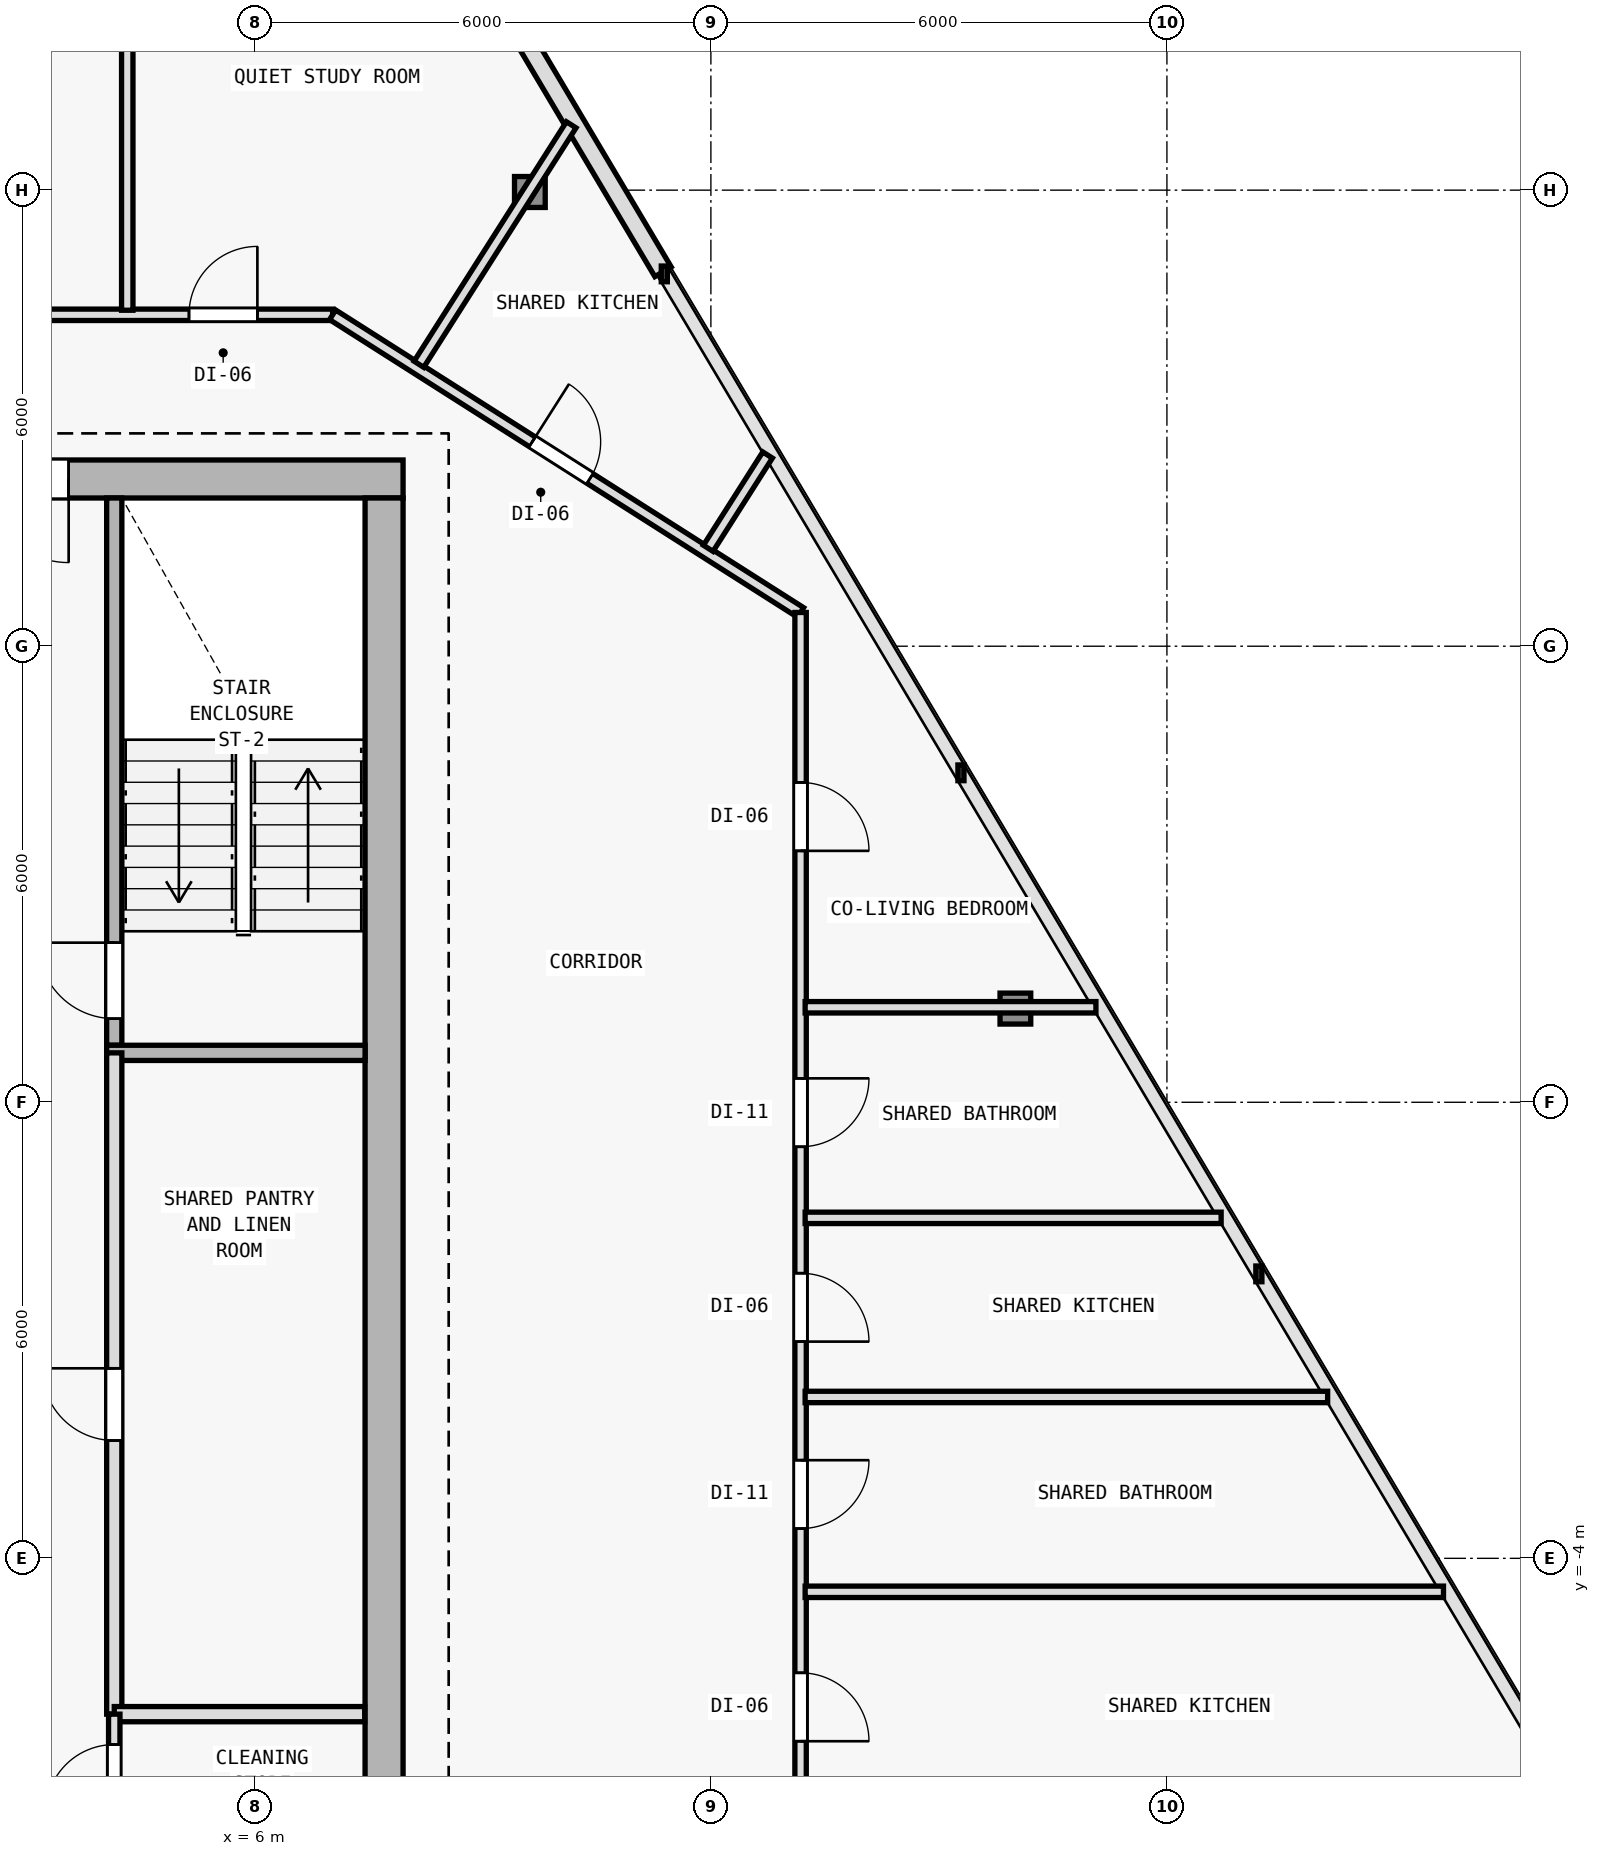
"""IFC4 building model, lengths in metres.
Left out: names, types, materials, properties, quantities, classifications, styles, units other than length and angle.
Written with IfcOpenShell. Run it as: python <this file> out.ifc"""

import sys

from ifc_helpers import new_model, si_unit, direction, frame, frame_2d, origin, origin_2d, place, context, subcontext, project, spatial, rectangle, i_section, extrude, element, fill, save


model = new_model("IFC4")
c1 = context("Model", 3, precision=1e-05, world=origin(), true_north=direction((0.0, 1.0)))
c2 = subcontext(c1, "Body", "Model", "MODEL_VIEW")
j1 = project(units=[si_unit("LENGTHUNIT", "METRE"), si_unit("PLANEANGLEUNIT", "RADIAN")], contexts=[c1])
p1 = place(None, origin())
s1 = spatial("IfcSite", under=j1, at=p1, CompositionType="ELEMENT")
p2 = place(p1, origin())
s2 = spatial("IfcBuilding", under=s1, at=p2, CompositionType="ELEMENT")
p3 = place(p2, frame((0.0, 0.0, 138.6)))
s3 = spatial("IfcBuildingStorey", under=s2, at=p3, CompositionType="ELEMENT", Elevation=138.6)
for number, where, z_axis, x_axis in (
    (1, (7.7, 10.2, 0.0), (0.0, 0.0, 1.0), (1.0, 0.0, 0.0)),
    (2, (7.7, 0.4, 0.0), (0.0, 0.0, 1.0), (1.0, 0.0, 0.0)),
):
    element("IfcColumn", number, at=place(p3, frame(where, z_axis=z_axis, x_axis=x_axis)), inside=s3, PredefinedType="COLUMN", context=c2, shape_type="SweptSolid", body=[
        extrude(i_section(OverallWidth=0.404, OverallDepth=0.407, WebThickness=0.017, FlangeThickness=0.028, FilletRadius=0.015, at=origin_2d()), origin(), (0.0, 0.0, 1.0), 3.6),
    ])
p4 = place(p3, frame((16.006, 3.233, 0.005), z_axis=(-0.018974023902, 0.009521015578, 0.999774642947), x_axis=(-0.44849454954, -0.893785566583, 0.0)))
e3 = element("IfcColumn", 3, at=p4, inside=s3, PredefinedType="COLUMN", context=c2, shape_type="SweptSolid", body=[
    extrude(i_section(OverallWidth=0.404, OverallDepth=0.407, WebThickness=0.017, FlangeThickness=0.028, FilletRadius=0.015, at=origin_2d()), origin(), (0.0, 0.0, 1.0), 3.59),
])
p5 = place(p3, frame((9.618, 13.976, 0.005), z_axis=(-0.011767054935, -0.002516653368, 0.999927598816), x_axis=(0.209143047003, -0.977885057607, 0.0)))
e4 = element("IfcColumn", 4, at=p5, inside=s3, PredefinedType="COLUMN", context=c2, shape_type="SweptSolid", body=[
    extrude(i_section(OverallWidth=0.404, OverallDepth=0.407, WebThickness=0.017, FlangeThickness=0.028, FilletRadius=0.015, at=origin_2d()), origin(), (0.0, 0.0, 1.0), 3.589),
])
p6 = place(p3, frame((5.862, 22.19, 0.0), z_axis=(0.0, 0.0, 1.0), x_axis=(0.511083986456, -0.859530778267, 0.0)))
e5 = element("IfcWall", 5, at=p6, inside=s3, PredefinedType="SOLIDWALL", context=c2, shape_type="SweptSolid", body=[
    extrude(rectangle(XDim=10.778, YDim=0.25, at=frame_2d((5.389, 0.0))), origin(), (0.0, 0.0, 1.0), 3.35),
])
p7 = place(p6, frame((4.789, 0.0, 0.62)))
e6 = element("IfcOpeningElement", 6, at=p7, cuts=e5, PredefinedType="OPENING", context=c2, shape_type="SweptSolid", body=[
    extrude(rectangle(XDim=1.2, YDim=1.8, at=frame_2d((0.6, 0.9))), frame((0.0, 0.135, 0.0), z_axis=(0.0, -1.0, 0.0), x_axis=(1.0, 0.0, 0.0)), (0.0, 0.0, 1.0), 0.27),
])
p8 = place(p3, frame((7.95, 10.2, 0.0), z_axis=(0.0, 0.0, 1.0), x_axis=(-1.0, 0.0, 0.0)))
e7 = element("IfcWall", 7, at=p8, inside=s3, PredefinedType="SHEAR", context=c2, shape_type="SweptSolid", body=[
    extrude(rectangle(XDim=15.9, YDim=0.5, at=frame_2d((7.95, 0.0))), origin(), (0.0, 0.0, 1.0), 3.35),
])
p9 = place(p8, frame((4.4, 0.0, 0.0)))
e8 = element("IfcOpeningElement", 8, at=p9, cuts=e7, PredefinedType="OPENING", context=c2, shape_type="SweptSolid", body=[
    extrude(rectangle(XDim=1.1, YDim=2.15, at=frame_2d((0.55, 1.075))), frame((0.0, 0.26, 0.0), z_axis=(0.0, -1.0, 0.0), x_axis=(1.0, 0.0, 0.0)), (0.0, 0.0, 1.0), 0.52),
])
p10 = place(p3, frame((7.7, 9.95, 0.0), z_axis=(0.0, 0.0, 1.0), x_axis=(0.0, -1.0, 0.0)))
e9 = element("IfcWall", 9, at=p10, inside=s3, PredefinedType="SHEAR", context=c2, shape_type="SweptSolid", body=[
    extrude(rectangle(XDim=19.1, YDim=0.5, at=frame_2d((9.55, 0.0))), origin(), (0.0, 0.0, 1.0), 3.35),
])
p11 = place(p3, frame((4.15, 2.75, 0.0), z_axis=(0.0, 0.0, 1.0), x_axis=(0.0, 1.0, 0.0)))
e10 = element("IfcWall", 10, at=p11, inside=s3, PredefinedType="SOLIDWALL", context=c2, shape_type="SweptSolid", body=[
    extrude(rectangle(XDim=7.2, YDim=0.2, at=frame_2d((3.6, 0.0))), origin(), (0.0, 0.0, 1.0), 3.35),
])
p12 = place(p11, frame((0.35, 0.0, 0.0)))
e11 = element("IfcOpeningElement", 11, at=p12, cuts=e10, PredefinedType="OPENING", context=c2, shape_type="SweptSolid", body=[
    extrude(rectangle(XDim=1.0, YDim=2.15, at=frame_2d((0.5, 1.075))), frame((0.0, 0.11, 0.0), z_axis=(0.0, -1.0, 0.0), x_axis=(1.0, 0.0, 0.0)), (0.0, 0.0, 1.0), 0.22),
])
p13 = place(p3, frame((4.05, 2.65, 0.0), z_axis=(0.0, 0.0, 1.0), x_axis=(1.0, 0.0, 0.0)))
e12 = element("IfcWall", 12, at=p13, inside=s3, PredefinedType="SOLIDWALL", context=c2, shape_type="SweptSolid", body=[
    extrude(rectangle(XDim=3.4, YDim=0.2, at=frame_2d((1.7, 0.0))), origin(), (0.0, 0.0, 1.0), 3.35),
])
p14 = place(p3, frame((4.15, -6.05, 0.0), z_axis=(0.0, 0.0, 1.0), x_axis=(0.0, 1.0, 0.0)))
e13 = element("IfcWall", 13, at=p14, inside=s3, PredefinedType="SOLIDWALL", context=c2, shape_type="SweptSolid", body=[
    extrude(rectangle(XDim=8.7, YDim=0.2, at=frame_2d((4.35, 0.0))), origin(), (0.0, 0.0, 1.0), 3.35),
])
p15 = place(p14, frame((3.6, 0.0, 0.0)))
e14 = element("IfcOpeningElement", 14, at=p15, cuts=e13, PredefinedType="OPENING", context=c2, shape_type="SweptSolid", body=[
    extrude(rectangle(XDim=0.95, YDim=2.1, at=frame_2d((0.475, 1.05))), frame((0.0, 0.11, 0.0), z_axis=(0.0, -1.0, 0.0), x_axis=(1.0, 0.0, 0.0)), (0.0, 0.0, 1.0), 0.22),
])
p16 = place(p3, frame((4.15, -6.05, 0.0), z_axis=(0.0, 0.0, 1.0), x_axis=(1.0, 0.0, 0.0)))
e15 = element("IfcWall", 15, at=p16, inside=s3, PredefinedType="SOLIDWALL", context=c2, shape_type="SweptSolid", body=[
    extrude(rectangle(XDim=3.295, YDim=0.2, at=frame_2d((1.647, 0.0))), origin(), (0.0, 0.0, 1.0), 3.35),
])
p17 = place(p3, frame((4.15, -9.145, 0.0), z_axis=(0.0, 0.0, 1.0), x_axis=(0.0, 1.0, 0.0)))
e16 = element("IfcWall", 16, at=p17, inside=s3, PredefinedType="PARTITIONING", context=c2, shape_type="SweptSolid", body=[
    extrude(rectangle(XDim=3.095, YDim=0.15, at=frame_2d((1.547, 0.0))), origin(), (0.0, 0.0, 1.0), 3.35),
])
p18 = place(p17, frame((0.245, 0.0, 0.0)))
e17 = element("IfcOpeningElement", 17, at=p18, cuts=e16, PredefinedType="OPENING", context=c2, shape_type="SweptSolid", body=[
    extrude(rectangle(XDim=0.9, YDim=2.1, at=frame_2d((0.45, 1.05))), frame((0.0, 0.085, 0.0), z_axis=(0.0, -1.0, 0.0), x_axis=(1.0, 0.0, 0.0)), (0.0, 0.0, 1.0), 0.17),
])
p19 = place(p17, frame((1.795, 0.0, 0.0)))
e18 = element("IfcOpeningElement", 18, at=p19, cuts=e16, PredefinedType="OPENING", context=c2, shape_type="SweptSolid", body=[
    extrude(rectangle(XDim=0.9, YDim=2.1, at=frame_2d((0.45, 1.05))), frame((0.0, 0.085, 0.0), z_axis=(0.0, -1.0, 0.0), x_axis=(1.0, 0.0, 0.0)), (0.0, 0.0, 1.0), 0.17),
])
p20 = place(p3, frame((-7.041, 12.36, 0.0), z_axis=(0.0, 0.0, 1.0), x_axis=(1.0, 0.0, 0.0)))
e19 = element("IfcWall", 19, at=p20, inside=s3, PredefinedType="PARTITIONING", context=c2, shape_type="SweptSolid", body=[
    extrude(rectangle(XDim=14.064, YDim=0.15, at=frame_2d((7.032, 0.0))), origin(), (0.0, 0.0, 1.0), 2.965),
])
p21 = place(p20, frame((12.174, 0.0, 0.0)))
e20 = element("IfcOpeningElement", 20, at=p21, cuts=e19, PredefinedType="OPENING", context=c2, shape_type="SweptSolid", body=[
    extrude(rectangle(XDim=0.9, YDim=2.1, at=frame_2d((0.45, 1.05))), frame((0.0, 0.085, 0.0), z_axis=(0.0, -1.0, 0.0), x_axis=(1.0, 0.0, 0.0)), (0.0, 0.0, 1.0), 0.17),
])
p22 = place(p20, frame((9.225, 0.0, 0.0)))
e21 = element("IfcOpeningElement", 21, at=p22, cuts=e19, PredefinedType="OPENING", context=c2, shape_type="SweptSolid", body=[
    extrude(rectangle(XDim=0.9, YDim=2.1, at=frame_2d((0.45, 1.05))), frame((0.0, 0.085, 0.0), z_axis=(0.0, -1.0, 0.0), x_axis=(1.0, 0.0, 0.0)), (0.0, 0.0, 1.0), 0.17),
])
p23 = place(p20, frame((3.633, 0.0, 0.0)))
e22 = element("IfcOpeningElement", 22, at=p23, cuts=e19, PredefinedType="OPENING", context=c2, shape_type="SweptSolid", body=[
    extrude(rectangle(XDim=0.9, YDim=2.1, at=frame_2d((0.45, 1.05))), frame((0.0, 0.085, 0.0), z_axis=(0.0, -1.0, 0.0), x_axis=(1.0, 0.0, 0.0)), (0.0, 0.0, 1.0), 0.17),
])
p24 = place(p3, frame((7.023, 12.36, 0.0), z_axis=(0.0, 0.0, 1.0), x_axis=(0.84376480085, -0.536713108511, 0.0)))
e23 = element("IfcWall", 23, at=p24, inside=s3, PredefinedType="PARTITIONING", context=c2, shape_type="SweptSolid", body=[
    extrude(rectangle(XDim=7.297, YDim=0.15, at=frame_2d((3.648, 0.0))), origin(), (0.0, 0.0, 1.0), 2.885),
])
p25 = place(p24, frame((3.113, 0.0, 0.0)))
e24 = element("IfcOpeningElement", 24, at=p25, cuts=e23, PredefinedType="OPENING", context=c2, shape_type="SweptSolid", body=[
    extrude(rectangle(XDim=0.9, YDim=2.1, at=frame_2d((0.45, 1.05))), frame((0.0, 0.085, 0.0), z_axis=(0.0, -1.0, 0.0), x_axis=(1.0, 0.0, 0.0)), (0.0, 0.0, 1.0), 0.17),
])
p26 = place(p3, frame((13.18, 8.444, 0.0), z_axis=(0.0, 0.0, 1.0), x_axis=(0.0, -1.0, 0.0)))
e25 = element("IfcWall", 25, at=p26, inside=s3, PredefinedType="PARTITIONING", context=c2, shape_type="SweptSolid", body=[
    extrude(rectangle(XDim=20.004, YDim=0.15, at=frame_2d((10.002, 0.0))), origin(), (0.0, 0.0, 1.0), 2.705),
])
p27 = place(p26, frame((17.421, 0.0, 0.0)))
e26 = element("IfcOpeningElement", 26, at=p27, cuts=e25, PredefinedType="OPENING", context=c2, shape_type="SweptSolid", body=[
    extrude(rectangle(XDim=0.9, YDim=2.1, at=frame_2d((0.45, 1.05))), frame((0.0, 0.085, 0.0), z_axis=(0.0, -1.0, 0.0), x_axis=(1.0, 0.0, 0.0)), (0.0, 0.0, 1.0), 0.17),
])
p28 = place(p26, frame((13.95, 0.0, 0.0)))
e27 = element("IfcOpeningElement", 27, at=p28, cuts=e25, PredefinedType="OPENING", context=c2, shape_type="SweptSolid", body=[
    extrude(rectangle(XDim=0.9, YDim=2.1, at=frame_2d((0.45, 1.05))), frame((0.0, 0.085, 0.0), z_axis=(0.0, -1.0, 0.0), x_axis=(1.0, 0.0, 0.0)), (0.0, 0.0, 1.0), 0.17),
])
p29 = place(p26, frame((11.153, 0.0, 0.0)))
e28 = element("IfcOpeningElement", 28, at=p29, cuts=e25, PredefinedType="OPENING", context=c2, shape_type="SweptSolid", body=[
    extrude(rectangle(XDim=0.9, YDim=2.1, at=frame_2d((0.45, 1.05))), frame((0.0, 0.085, 0.0), z_axis=(0.0, -1.0, 0.0), x_axis=(1.0, 0.0, 0.0)), (0.0, 0.0, 1.0), 0.17),
])
p30 = place(p26, frame((8.693, 0.0, 0.0)))
e29 = element("IfcOpeningElement", 29, at=p30, cuts=e25, PredefinedType="OPENING", context=c2, shape_type="SweptSolid", body=[
    extrude(rectangle(XDim=0.9, YDim=2.1, at=frame_2d((0.45, 1.05))), frame((0.0, 0.085, 0.0), z_axis=(0.0, -1.0, 0.0), x_axis=(1.0, 0.0, 0.0)), (0.0, 0.0, 1.0), 0.17),
])
p31 = place(p26, frame((6.129, 0.0, 0.0)))
e30 = element("IfcOpeningElement", 30, at=p31, cuts=e25, PredefinedType="OPENING", context=c2, shape_type="SweptSolid", body=[
    extrude(rectangle(XDim=0.9, YDim=2.1, at=frame_2d((0.45, 1.05))), frame((0.0, 0.085, 0.0), z_axis=(0.0, -1.0, 0.0), x_axis=(1.0, 0.0, 0.0)), (0.0, 0.0, 1.0), 0.17),
])
p32 = place(p26, frame((2.236, 0.0, 0.0)))
e31 = element("IfcOpeningElement", 31, at=p32, cuts=e25, PredefinedType="OPENING", context=c2, shape_type="SweptSolid", body=[
    extrude(rectangle(XDim=0.9, YDim=2.1, at=frame_2d((0.45, 1.05))), frame((0.0, 0.085, 0.0), z_axis=(0.0, -1.0, 0.0), x_axis=(1.0, 0.0, 0.0)), (0.0, 0.0, 1.0), 0.17),
])
p33 = place(p3, frame((13.24, 3.25, 0.0), z_axis=(0.0, 0.0, 1.0), x_axis=(1.0, 0.0, 0.0)))
e32 = element("IfcWall", 32, at=p33, inside=s3, PredefinedType="PARTITIONING", context=c2, shape_type="SweptSolid", body=[
    extrude(rectangle(XDim=3.826, YDim=0.15, at=frame_2d((1.913, 0.0))), origin(), (0.0, 0.0, 1.0), 2.885),
])
p34 = place(p3, frame((8.158, 11.709, 0.0), z_axis=(0.0, 0.0, 1.0), x_axis=(0.53672318118, 0.843758393608, 0.0)))
e33 = element("IfcWall", 33, at=p34, inside=s3, PredefinedType="PARTITIONING", context=c2, shape_type="SweptSolid", body=[
    extrude(rectangle(XDim=3.734, YDim=0.15, at=frame_2d((1.867, 0.0))), origin(), (0.0, 0.0, 1.0), 2.885),
])
p35 = place(p3, frame((13.24, -1.877, 0.0), z_axis=(0.0, 0.0, 1.0), x_axis=(1.0, 0.0, 0.0)))
e34 = element("IfcWall", 34, at=p35, inside=s3, PredefinedType="PARTITIONING", context=c2, shape_type="SweptSolid", body=[
    extrude(rectangle(XDim=6.875, YDim=0.15, at=frame_2d((3.437, 0.0))), origin(), (0.0, 0.0, 1.0), 2.885),
])
p36 = place(p3, frame((11.965, 9.288, 0.0), z_axis=(0.0, 0.0, 1.0), x_axis=(0.536680019881, 0.843785847393, 0.0)))
e35 = element("IfcWall", 35, at=p36, inside=s3, PredefinedType="PARTITIONING", context=c2, shape_type="SweptSolid", body=[
    extrude(rectangle(XDim=1.455, YDim=0.15, at=frame_2d((0.728, 0.0))), origin(), (0.0, 0.0, 1.0), 2.885),
])
p37 = place(p3, frame((13.24, -4.44, 0.0), z_axis=(0.0, 0.0, 1.0), x_axis=(1.0, 0.0, 0.0)))
e36 = element("IfcWall", 36, at=p37, inside=s3, PredefinedType="PARTITIONING", context=c2, shape_type="SweptSolid", body=[
    extrude(rectangle(XDim=8.399, YDim=0.15, at=frame_2d((4.199, 0.0))), origin(), (0.0, 0.0, 1.0), 2.885),
])
p38 = place(p3, frame((13.24, 0.479, 0.0), z_axis=(0.0, 0.0, 1.0), x_axis=(1.0, 0.0, 0.0)))
e37 = element("IfcWall", 37, at=p38, inside=s3, PredefinedType="PARTITIONING", context=c2, shape_type="SweptSolid", body=[
    extrude(rectangle(XDim=5.473, YDim=0.15, at=frame_2d((2.737, 0.0))), origin(), (0.0, 0.0, 1.0), 2.885),
])
p39 = place(p3, frame((4.321, 12.42, 0.0), z_axis=(0.0, 0.0, 1.0), x_axis=(0.0, 1.0, 0.0)))
e38 = element("IfcWall", 38, at=p39, inside=s3, PredefinedType="PARTITIONING", context=c2, shape_type="SweptSolid", body=[
    extrude(rectangle(XDim=8.932, YDim=0.15, at=frame_2d((4.466, 0.0))), origin(), (0.0, 0.0, 1.0), 2.885),
])
p40 = place(p9, origin())
e39 = element("IfcDoor", 39, at=p40, inside=s3, OperationType="SINGLE_SWING_LEFT", PredefinedType="DOOR", context=c2, shape_type="SweptSolid", body=[
    extrude(rectangle(XDim=1.1, YDim=2.15, at=frame_2d((0.55, 1.075))), frame((0.0, 0.025, 0.0), z_axis=(0.0, -1.0, 0.0), x_axis=(1.0, 0.0, 0.0)), (0.0, 0.0, 1.0), 0.05),
])
fill(e8, e39)
p41 = place(p12, origin())
e40 = element("IfcDoor", 40, at=p41, inside=s3, OperationType="SINGLE_SWING_RIGHT", PredefinedType="DOOR", context=c2, shape_type="SweptSolid", body=[
    extrude(rectangle(XDim=1.0, YDim=2.15, at=frame_2d((0.5, 1.075))), frame((0.0, 0.025, 0.0), z_axis=(0.0, -1.0, 0.0), x_axis=(1.0, 0.0, 0.0)), (0.0, 0.0, 1.0), 0.05),
])
fill(e11, e40)
p42 = place(p15, origin())
e41 = element("IfcDoor", 41, at=p42, inside=s3, OperationType="SINGLE_SWING_RIGHT", PredefinedType="DOOR", context=c2, shape_type="SweptSolid", body=[
    extrude(rectangle(XDim=0.95, YDim=2.1, at=frame_2d((0.475, 1.05))), frame((0.0, 0.025, 0.0), z_axis=(0.0, -1.0, 0.0), x_axis=(1.0, 0.0, 0.0)), (0.0, 0.0, 1.0), 0.05),
])
fill(e14, e41)
p43 = place(p19, origin())
e42 = element("IfcDoor", 42, at=p43, inside=s3, OperationType="SINGLE_SWING_LEFT", PredefinedType="DOOR", context=c2, shape_type="SweptSolid", body=[
    extrude(rectangle(XDim=0.9, YDim=2.1, at=frame_2d((0.45, 1.05))), frame((0.0, 0.025, 0.0), z_axis=(0.0, -1.0, 0.0), x_axis=(1.0, 0.0, 0.0)), (0.0, 0.0, 1.0), 0.05),
])
fill(e18, e42)
p44 = place(p28, origin())
e43 = element("IfcDoor", 43, at=p44, inside=s3, OperationType="SINGLE_SWING_RIGHT", PredefinedType="DOOR", context=c2, shape_type="SweptSolid", body=[
    extrude(rectangle(XDim=0.9, YDim=2.1, at=frame_2d((0.45, 1.05))), frame((0.0, 0.025, 0.0), z_axis=(0.0, -1.0, 0.0), x_axis=(1.0, 0.0, 0.0)), (0.0, 0.0, 1.0), 0.05),
])
fill(e27, e43)
p45 = place(p29, origin())
e44 = element("IfcDoor", 44, at=p45, inside=s3, OperationType="SINGLE_SWING_LEFT", PredefinedType="DOOR", context=c2, shape_type="SweptSolid", body=[
    extrude(rectangle(XDim=0.9, YDim=2.1, at=frame_2d((0.45, 1.05))), frame((0.0, 0.025, 0.0), z_axis=(0.0, -1.0, 0.0), x_axis=(1.0, 0.0, 0.0)), (0.0, 0.0, 1.0), 0.05),
])
fill(e28, e44)
p46 = place(p30, origin())
e45 = element("IfcDoor", 45, at=p46, inside=s3, OperationType="SINGLE_SWING_RIGHT", PredefinedType="DOOR", context=c2, shape_type="SweptSolid", body=[
    extrude(rectangle(XDim=0.9, YDim=2.1, at=frame_2d((0.45, 1.05))), frame((0.0, 0.025, 0.0), z_axis=(0.0, -1.0, 0.0), x_axis=(1.0, 0.0, 0.0)), (0.0, 0.0, 1.0), 0.05),
])
fill(e29, e45)
p47 = place(p31, origin())
e46 = element("IfcDoor", 46, at=p47, inside=s3, OperationType="SINGLE_SWING_LEFT", PredefinedType="DOOR", context=c2, shape_type="SweptSolid", body=[
    extrude(rectangle(XDim=0.9, YDim=2.1, at=frame_2d((0.45, 1.05))), frame((0.0, 0.025, 0.0), z_axis=(0.0, -1.0, 0.0), x_axis=(1.0, 0.0, 0.0)), (0.0, 0.0, 1.0), 0.05),
])
fill(e30, e46)
p48 = place(p32, origin())
e47 = element("IfcDoor", 47, at=p48, inside=s3, OperationType="SINGLE_SWING_RIGHT", PredefinedType="DOOR", context=c2, shape_type="SweptSolid", body=[
    extrude(rectangle(XDim=0.9, YDim=2.1, at=frame_2d((0.45, 1.05))), frame((0.0, 0.025, 0.0), z_axis=(0.0, -1.0, 0.0), x_axis=(1.0, 0.0, 0.0)), (0.0, 0.0, 1.0), 0.05),
])
fill(e31, e47)
p49 = place(p25, origin())
e48 = element("IfcDoor", 48, at=p49, inside=s3, OperationType="SINGLE_SWING_LEFT", PredefinedType="DOOR", context=c2, shape_type="SweptSolid", body=[
    extrude(rectangle(XDim=0.9, YDim=2.1, at=frame_2d((0.45, 1.05))), frame((0.0, 0.025, 0.0), z_axis=(0.0, -1.0, 0.0), x_axis=(1.0, 0.0, 0.0)), (0.0, 0.0, 1.0), 0.05),
])
fill(e24, e48)
p50 = place(p21, origin())
e49 = element("IfcDoor", 49, at=p50, inside=s3, OperationType="SINGLE_SWING_RIGHT", PredefinedType="DOOR", context=c2, shape_type="SweptSolid", body=[
    extrude(rectangle(XDim=0.9, YDim=2.1, at=frame_2d((0.45, 1.05))), frame((0.0, 0.025, 0.0), z_axis=(0.0, -1.0, 0.0), x_axis=(1.0, 0.0, 0.0)), (0.0, 0.0, 1.0), 0.05),
])
fill(e20, e49)
save(model, sys.argv[1])
